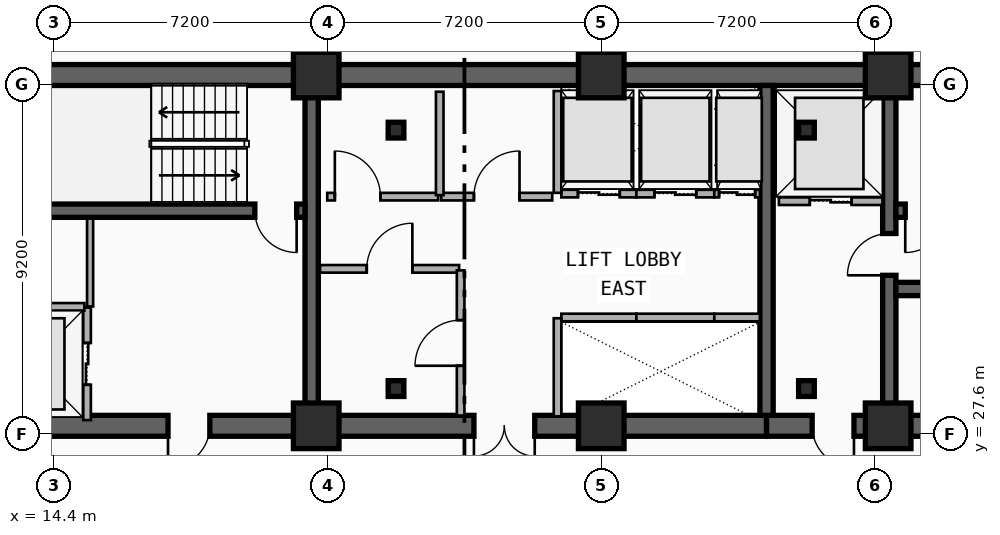
"""IFC4 building model, lengths in metres.
Left out: names, types, materials, properties, quantities, classifications, styles, units other than length and angle.
Written with IfcOpenShell. Run it as: python <this file> out.ifc"""

import sys

from ifc_helpers import new_model, si_unit, direction, frame, frame_2d, origin, origin_2d, place, context, subcontext, project, spatial, rectangle, i_section, extrude, element, fill, save


model = new_model("IFC4")
c1 = context("Model", 3, precision=1e-05, world=origin(), true_north=direction((0.0, 1.0)))
c2 = subcontext(c1, "Body", "Model", "MODEL_VIEW")
j1 = project(units=[si_unit("LENGTHUNIT", "METRE"), si_unit("PLANEANGLEUNIT", "RADIAN")], contexts=[c1])
p1 = place(None, origin())
s1 = spatial("IfcSite", under=j1, at=p1, CompositionType="ELEMENT")
p2 = place(p1, origin())
s2 = spatial("IfcBuilding", under=s1, at=p2, CompositionType="ELEMENT")
p3 = place(p2, frame((0.0, 0.0, 137.7)))
s3 = spatial("IfcBuildingStorey", under=s2, at=p3, CompositionType="ELEMENT", Elevation=137.7)
p4 = place(p3, frame((12.15, 37.05, 0.0), z_axis=(0.0, 0.0, 1.0), x_axis=(1.0, 0.0, 0.0)))
e1 = element("IfcWall", 1, at=p4, inside=s3, PredefinedType="SHEAR", context=c2, shape_type="SweptSolid", body=[
    extrude(rectangle(XDim=33.23, YDim=0.55, at=frame_2d((16.615, 0.0))), origin(), (0.0, 0.0, 1.0), 3.55),
])
p5 = place(p3, frame((21.18, 27.82, 0.0), z_axis=(0.0, 0.0, 1.0), x_axis=(-1.0, 0.0, 0.0)))
e2 = element("IfcWall", 2, at=p5, inside=s3, PredefinedType="SHEAR", context=c2, shape_type="SweptSolid", body=[
    extrude(rectangle(XDim=9.03, YDim=0.55, at=frame_2d((4.515, 0.0))), origin(), (0.0, 0.0, 1.0), 3.55),
])
p6 = place(p5, frame((2.68, 0.0, 0.0)))
e3 = element("IfcOpeningElement", 3, at=p6, cuts=e2, PredefinedType="OPENING", context=c2, shape_type="SweptSolid", body=[
    extrude(rectangle(XDim=1.1, YDim=2.15, at=frame_2d((0.55, 1.075))), frame((0.0, 0.285, 0.0), z_axis=(0.0, -1.0, 0.0), x_axis=(1.0, 0.0, 0.0)), (0.0, 0.0, 1.0), 0.57),
])
p7 = place(p3, frame((33.15, 27.82, 0.0), z_axis=(0.0, 0.0, 1.0), x_axis=(-1.0, 0.0, 0.0)))
e4 = element("IfcWall", 4, at=p7, inside=s3, PredefinedType="SHEAR", context=c2, shape_type="SweptSolid", body=[
    extrude(rectangle(XDim=11.97, YDim=0.55, at=frame_2d((5.985, 0.0))), origin(), (0.0, 0.0, 1.0), 3.55),
])
p8 = place(p7, frame((6.1, 0.0, 0.0)))
e5 = element("IfcOpeningElement", 5, at=p8, cuts=e4, PredefinedType="OPENING", context=c2, shape_type="SweptSolid", body=[
    extrude(rectangle(XDim=1.6, YDim=2.2, at=frame_2d((0.8, 1.1))), frame((0.0, 0.285, 0.0), z_axis=(0.0, -1.0, 0.0), x_axis=(1.0, 0.0, 0.0)), (0.0, 0.0, 1.0), 0.57),
])
p9 = place(p3, frame((45.38, 27.82, 0.0), z_axis=(0.0, 0.0, 1.0), x_axis=(-1.0, 0.0, 0.0)))
e6 = element("IfcWall", 6, at=p9, inside=s3, PredefinedType="SHEAR", context=c2, shape_type="SweptSolid", body=[
    extrude(rectangle(XDim=12.23, YDim=0.55, at=frame_2d((6.115, 0.0))), origin(), (0.0, 0.0, 1.0), 3.55),
])
p10 = place(p9, frame((9.93, 0.0, 0.0)))
e7 = element("IfcOpeningElement", 7, at=p10, cuts=e6, PredefinedType="OPENING", context=c2, shape_type="SweptSolid", body=[
    extrude(rectangle(XDim=1.1, YDim=2.15, at=frame_2d((0.55, 1.075))), frame((0.0, 0.285, 0.0), z_axis=(0.0, -1.0, 0.0), x_axis=(1.0, 0.0, 0.0)), (0.0, 0.0, 1.0), 0.57),
])
p11 = place(p9, frame((6.23, 0.0, 0.0)))
e8 = element("IfcOpeningElement", 8, at=p11, cuts=e6, PredefinedType="OPENING", context=c2, shape_type="SweptSolid", body=[
    extrude(rectangle(XDim=1.1, YDim=2.15, at=frame_2d((0.55, 1.075))), frame((0.0, 0.285, 0.0), z_axis=(0.0, -1.0, 0.0), x_axis=(1.0, 0.0, 0.0)), (0.0, 0.0, 1.0), 0.57),
])
for number, where, z_axis, x_axis in (
    (9, (21.18, 28.095, 0.0), (0.0, 0.0, 1.0), (0.0, 1.0, 0.0)),
    (10, (33.15, 28.095, 0.0), (0.0, 0.0, 1.0), (0.0, 1.0, 0.0)),
):
    element("IfcWall", number, at=place(p3, frame(where, z_axis=z_axis, x_axis=x_axis)), inside=s3, PredefinedType="SHEAR", context=c2, shape_type="SweptSolid", body=[
        extrude(rectangle(XDim=8.68, YDim=0.35, at=frame_2d((4.34, 0.0))), origin(), (0.0, 0.0, 1.0), 3.55),
    ])
p12 = place(p3, frame((36.38, 28.095, 0.0), z_axis=(0.0, 0.0, 1.0), x_axis=(0.0, 1.0, 0.0)))
e11 = element("IfcWall", 11, at=p12, inside=s3, PredefinedType="SHEAR", context=c2, shape_type="SweptSolid", body=[
    extrude(rectangle(XDim=8.68, YDim=0.35, at=frame_2d((4.34, 0.0))), origin(), (0.0, 0.0, 1.0), 3.55),
])
p13 = place(p12, frame((3.685, 0.0, 0.0)))
e12 = element("IfcOpeningElement", 12, at=p13, cuts=e11, PredefinedType="OPENING", context=c2, shape_type="SweptSolid", body=[
    extrude(rectangle(XDim=1.1, YDim=2.15, at=frame_2d((0.55, 1.075))), frame((0.0, 0.185, 0.0), z_axis=(0.0, -1.0, 0.0), x_axis=(1.0, 0.0, 0.0)), (0.0, 0.0, 1.0), 0.37),
])
p14 = place(p3, frame((21.005, 33.48, 0.0), z_axis=(0.0, 0.0, 1.0), x_axis=(-1.0, 0.0, 0.0)))
e13 = element("IfcWall", 13, at=p14, inside=s3, PredefinedType="SHEAR", context=c2, shape_type="SweptSolid", body=[
    extrude(rectangle(XDim=8.58, YDim=0.35, at=frame_2d((4.29, 0.0))), origin(), (0.0, 0.0, 1.0), 3.55),
])
p15 = place(p14, frame((0.22, 0.0, 0.0)))
e14 = element("IfcOpeningElement", 14, at=p15, cuts=e13, PredefinedType="OPENING", context=c2, shape_type="SweptSolid", body=[
    extrude(rectangle(XDim=1.1, YDim=2.15, at=frame_2d((0.55, 1.075))), frame((0.0, 0.185, 0.0), z_axis=(0.0, -1.0, 0.0), x_axis=(1.0, 0.0, 0.0)), (0.0, 0.0, 1.0), 0.37),
])
p16 = place(p3, frame((45.105, 33.48, 0.0), z_axis=(0.0, 0.0, 1.0), x_axis=(-1.0, 0.0, 0.0)))
e15 = element("IfcWall", 15, at=p16, inside=s3, PredefinedType="SHEAR", context=c2, shape_type="SweptSolid", body=[
    extrude(rectangle(XDim=8.55, YDim=0.35, at=frame_2d((4.275, 0.0))), origin(), (0.0, 0.0, 1.0), 3.55),
])
p17 = place(p16, frame((7.205, 0.0, 0.0)))
e16 = element("IfcOpeningElement", 16, at=p17, cuts=e15, PredefinedType="OPENING", context=c2, shape_type="SweptSolid", body=[
    extrude(rectangle(XDim=1.1, YDim=2.15, at=frame_2d((0.55, 1.075))), frame((0.0, 0.185, 0.0), z_axis=(0.0, -1.0, 0.0), x_axis=(1.0, 0.0, 0.0)), (0.0, 0.0, 1.0), 0.37),
])
p18 = place(p3, frame((36.555, 31.42, 0.0), z_axis=(0.0, 0.0, 1.0), x_axis=(1.0, 0.0, 0.0)))
e17 = element("IfcWall", 17, at=p18, inside=s3, PredefinedType="SHEAR", context=c2, shape_type="SweptSolid", body=[
    extrude(rectangle(XDim=8.55, YDim=0.35, at=frame_2d((4.275, 0.0))), origin(), (0.0, 0.0, 1.0), 3.55),
])
for number, where, z_axis, x_axis in (
    (18, (23.4, 28.8, 0.0), (0.0, 0.0, 1.0), (1.0, 0.0, 0.0)),
    (19, (34.2, 28.8, 0.0), (0.0, 0.0, 1.0), (1.0, 0.0, 0.0)),
    (20, (34.2, 35.6, 0.0), (0.0, 0.0, 1.0), (1.0, 0.0, 0.0)),
    (21, (23.4, 35.6, 0.0), (0.0, 0.0, 1.0), (1.0, 0.0, 0.0)),
):
    element("IfcColumn", number, at=place(p3, frame(where, z_axis=z_axis, x_axis=x_axis)), inside=s3, PredefinedType="COLUMN", context=c2, shape_type="SweptSolid", body=[
        extrude(i_section(OverallWidth=0.413, OverallDepth=0.415, WebThickness=0.03, FlangeThickness=0.047, FilletRadius=0.015, at=origin_2d()), origin(), (0.0, 0.0, 1.0), 3.55),
    ])
for number, where, z_axis, x_axis in (
    (22, (21.3, 27.82, 0.0), (0.0, 0.0, 1.0), (1.0, 0.0, 0.0)),
    (23, (21.3, 37.05, 0.0), (0.0, 0.0, 1.0), (1.0, 0.0, 0.0)),
    (24, (28.8, 27.82, 0.0), (0.0, 0.0, 1.0), (1.0, 0.0, 0.0)),
    (25, (28.8, 37.05, 0.0), (0.0, 0.0, 1.0), (1.0, 0.0, 0.0)),
    (26, (36.35, 27.82, 0.0), (0.0, 0.0, 1.0), (1.0, 0.0, 0.0)),
    (27, (36.35, 37.05, 0.0), (0.0, 0.0, 1.0), (1.0, 0.0, 0.0)),
):
    element("IfcColumn", number, at=place(p3, frame(where, z_axis=z_axis, x_axis=x_axis)), inside=s3, PredefinedType="COLUMN", context=c2, shape_type="SweptSolid", body=[
        extrude(rectangle(XDim=1.2, YDim=1.2, at=origin_2d()), origin(), (0.0, 0.0, 1.0), 3.55),
    ])
p19 = place(p3, frame((15.27, 27.97, 0.0), z_axis=(0.0, 0.0, 1.0), x_axis=(0.0, 1.0, 0.0)))
e28 = element("IfcWall", 28, at=p19, inside=s3, PredefinedType="PARTITIONING", context=c2, shape_type="SweptSolid", body=[
    extrude(rectangle(XDim=2.96, YDim=0.2, at=frame_2d((1.48, 0.0))), origin(), (0.0, 0.0, 1.0), 2.36),
])
p20 = place(p19, frame((0.93, 0.0, 0.0)))
e29 = element("IfcOpeningElement", 29, at=p20, cuts=e28, PredefinedType="OPENING", context=c2, shape_type="SweptSolid", body=[
    extrude(rectangle(XDim=1.1, YDim=2.15, at=frame_2d((0.55, 1.075))), frame((0.0, 0.11, 0.0), z_axis=(0.0, -1.0, 0.0), x_axis=(1.0, 0.0, 0.0)), (0.0, 0.0, 1.0), 0.22),
])
p21 = place(p3, frame((12.45, 30.95, 0.0), z_axis=(0.0, 0.0, 1.0), x_axis=(1.0, 0.0, 0.0)))
e30 = element("IfcWall", 30, at=p21, inside=s3, PredefinedType="PARTITIONING", context=c2, shape_type="SweptSolid", body=[
    extrude(rectangle(XDim=2.75, YDim=0.2, at=frame_2d((1.375, 0.0))), origin(), (0.0, 0.0, 1.0), 2.36),
])
p22 = place(p3, frame((33.475, 33.73, 0.0), z_axis=(0.0, 0.0, 1.0), x_axis=(1.0, 0.0, 0.0)))
e31 = element("IfcWall", 31, at=p22, inside=s3, PredefinedType="PARTITIONING", context=c2, shape_type="SweptSolid", body=[
    extrude(rectangle(XDim=2.725, YDim=0.2, at=frame_2d((1.362, 0.0))), origin(), (0.0, 0.0, 1.0), 2.36),
])
p23 = place(p22, frame((0.812, 0.0, 0.0)))
e32 = element("IfcOpeningElement", 32, at=p23, cuts=e31, PredefinedType="OPENING", context=c2, shape_type="SweptSolid", body=[
    extrude(rectangle(XDim=1.1, YDim=2.15, at=frame_2d((0.55, 1.075))), frame((0.0, 0.11, 0.0), z_axis=(0.0, -1.0, 0.0), x_axis=(1.0, 0.0, 0.0)), (0.0, 0.0, 1.0), 0.22),
])
p24 = place(p3, frame((27.75, 30.67, 0.0), z_axis=(0.0, 0.0, 1.0), x_axis=(1.0, 0.0, 0.0)))
e33 = element("IfcWall", 33, at=p24, inside=s3, PredefinedType="PARTITIONING", context=c2, shape_type="SweptSolid", body=[
    extrude(rectangle(XDim=1.975, YDim=0.2, at=frame_2d((0.988, 0.0))), origin(), (0.0, 0.0, 1.0), 2.36),
])
p25 = place(p3, frame((27.65, 28.07, 0.0), z_axis=(0.0, 0.0, 1.0), x_axis=(0.0, 1.0, 0.0)))
e34 = element("IfcWall", 34, at=p25, inside=s3, PredefinedType="PARTITIONING", context=c2, shape_type="SweptSolid", body=[
    extrude(rectangle(XDim=2.58, YDim=0.2, at=frame_2d((1.29, 0.0))), origin(), (0.0, 0.0, 1.0), 2.36),
])
p26 = place(p3, frame((29.725, 30.67, 0.0), z_axis=(0.0, 0.0, 1.0), x_axis=(1.0, 0.0, 0.0)))
e35 = element("IfcWall", 35, at=p26, inside=s3, PredefinedType="PARTITIONING", context=c2, shape_type="SweptSolid", body=[
    extrude(rectangle(XDim=2.05, YDim=0.2, at=frame_2d((1.025, 0.0))), origin(), (0.0, 0.0, 1.0), 2.67),
])
p27 = place(p3, frame((31.775, 30.67, 0.0), z_axis=(0.0, 0.0, 1.0), x_axis=(1.0, 0.0, 0.0)))
e36 = element("IfcWall", 36, at=p27, inside=s3, PredefinedType="PARTITIONING", context=c2, shape_type="SweptSolid", body=[
    extrude(rectangle(XDim=1.2, YDim=0.2, at=frame_2d((0.6, 0.0))), origin(), (0.0, 0.0, 1.0), 2.67),
])
p28 = place(p3, frame((27.75, 33.93, 0.0), z_axis=(0.0, 0.0, 1.0), x_axis=(1.0, 0.0, 0.0)))
e37 = element("IfcWall", 37, at=p28, inside=s3, PredefinedType="PARTITIONING", context=c2, shape_type="SweptSolid", body=[
    extrude(rectangle(XDim=1.975, YDim=0.2, at=frame_2d((0.988, 0.0))), origin(), (0.0, 0.0, 1.0), 2.36),
])
p29 = place(p28, frame((0.438, 0.0, 0.0)))
e38 = element("IfcOpeningElement", 38, at=p29, cuts=e37, PredefinedType="OPENING", context=c2, shape_type="SweptSolid", body=[
    extrude(rectangle(XDim=1.1, YDim=2.15, at=frame_2d((0.55, 1.075))), frame((0.0, 0.11, 0.0), z_axis=(0.0, -1.0, 0.0), x_axis=(1.0, 0.0, 0.0)), (0.0, 0.0, 1.0), 0.22),
])
p30 = place(p3, frame((27.65, 33.95, 0.0), z_axis=(0.0, 0.0, 1.0), x_axis=(0.0, 1.0, 0.0)))
e39 = element("IfcWall", 39, at=p30, inside=s3, PredefinedType="PARTITIONING", context=c2, shape_type="SweptSolid", body=[
    extrude(rectangle(XDim=2.68, YDim=0.2, at=frame_2d((1.34, 0.0))), origin(), (0.0, 0.0, 1.0), 2.36),
])
p31 = place(p3, frame((29.725, 33.93, 0.0), z_axis=(0.0, 0.0, 1.0), x_axis=(1.0, 0.0, 0.0)))
e40 = element("IfcWall", 40, at=p31, inside=s3, PredefinedType="PARTITIONING", context=c2, shape_type="SweptSolid", body=[
    extrude(rectangle(XDim=2.05, YDim=0.2, at=frame_2d((1.025, 0.0))), origin(), (0.0, 0.0, 1.0), 3.29),
])
p32 = place(p31, frame((0.475, 0.0, 0.0)))
e41 = element("IfcOpeningElement", 41, at=p32, cuts=e40, PredefinedType="OPENING", context=c2, shape_type="SweptSolid", body=[
    extrude(rectangle(XDim=1.1, YDim=2.15, at=frame_2d((0.55, 1.075))), frame((0.0, 0.11, 0.0), z_axis=(0.0, -1.0, 0.0), x_axis=(1.0, 0.0, 0.0)), (0.0, 0.0, 1.0), 0.22),
])
p33 = place(p3, frame((31.775, 33.93, 0.0), z_axis=(0.0, 0.0, 1.0), x_axis=(1.0, 0.0, 0.0)))
e42 = element("IfcWall", 42, at=p33, inside=s3, PredefinedType="PARTITIONING", context=c2, shape_type="SweptSolid", body=[
    extrude(rectangle(XDim=1.2, YDim=0.2, at=frame_2d((0.6, 0.0))), origin(), (0.0, 0.0, 1.0), 3.29),
])
p34 = place(p33, frame((0.125, 0.0, 0.0)))
e43 = element("IfcOpeningElement", 43, at=p34, cuts=e42, PredefinedType="OPENING", context=c2, shape_type="SweptSolid", body=[
    extrude(rectangle(XDim=0.95, YDim=2.15, at=frame_2d((0.475, 1.075))), frame((0.0, 0.11, 0.0), z_axis=(0.0, -1.0, 0.0), x_axis=(1.0, 0.0, 0.0)), (0.0, 0.0, 1.0), 0.22),
])
p35 = place(p3, frame((21.4, 31.95, 0.0), z_axis=(0.0, 0.0, 1.0), x_axis=(1.0, 0.0, 0.0)))
e44 = element("IfcWall", 44, at=p35, inside=s3, PredefinedType="PARTITIONING", context=c2, shape_type="SweptSolid", body=[
    extrude(rectangle(XDim=3.66, YDim=0.2, at=frame_2d((1.83, 0.0))), origin(), (0.0, 0.0, 1.0), 2.36),
])
p36 = place(p35, frame((1.23, 0.0, 0.0)))
e45 = element("IfcOpeningElement", 45, at=p36, cuts=e44, PredefinedType="OPENING", context=c2, shape_type="SweptSolid", body=[
    extrude(rectangle(XDim=1.2, YDim=2.15, at=frame_2d((0.6, 1.075))), frame((0.0, 0.11, 0.0), z_axis=(0.0, -1.0, 0.0), x_axis=(1.0, 0.0, 0.0)), (0.0, 0.0, 1.0), 0.22),
])
p37 = place(p3, frame((21.59, 33.85, 0.0), z_axis=(0.0, 0.0, 1.0), x_axis=(1.0, 0.0, 0.0)))
e46 = element("IfcWall", 46, at=p37, inside=s3, PredefinedType="PARTITIONING", context=c2, shape_type="SweptSolid", body=[
    extrude(rectangle(XDim=2.92, YDim=0.2, at=frame_2d((1.46, 0.0))), origin(), (0.0, 0.0, 1.0), 2.36),
])
p38 = place(p37, frame((0.2, 0.0, 0.0)))
e47 = element("IfcOpeningElement", 47, at=p38, cuts=e46, PredefinedType="OPENING", context=c2, shape_type="SweptSolid", body=[
    extrude(rectangle(XDim=1.2, YDim=2.15, at=frame_2d((0.6, 1.075))), frame((0.0, 0.11, 0.0), z_axis=(0.0, -1.0, 0.0), x_axis=(1.0, 0.0, 0.0)), (0.0, 0.0, 1.0), 0.22),
])
p39 = place(p3, frame((24.59, 33.85, 0.0), z_axis=(0.0, 0.0, 1.0), x_axis=(1.0, 0.0, 0.0)))
e48 = element("IfcWall", 48, at=p39, inside=s3, PredefinedType="PARTITIONING", context=c2, shape_type="SweptSolid", body=[
    extrude(rectangle(XDim=2.92, YDim=0.2, at=frame_2d((1.46, 0.0))), origin(), (0.0, 0.0, 1.0), 3.29),
])
p40 = place(p39, frame((0.86, 0.0, 0.0)))
e49 = element("IfcOpeningElement", 49, at=p40, cuts=e48, PredefinedType="OPENING", context=c2, shape_type="SweptSolid", body=[
    extrude(rectangle(XDim=1.2, YDim=2.15, at=frame_2d((0.6, 1.075))), frame((0.0, 0.11, 0.0), z_axis=(0.0, -1.0, 0.0), x_axis=(1.0, 0.0, 0.0)), (0.0, 0.0, 1.0), 0.22),
])
p41 = place(p3, frame((25.1, 28.09, 0.0), z_axis=(0.0, 0.0, 1.0), x_axis=(0.0, 1.0, 0.0)))
e50 = element("IfcWall", 50, at=p41, inside=s3, PredefinedType="PARTITIONING", context=c2, shape_type="SweptSolid", body=[
    extrude(rectangle(XDim=3.82, YDim=0.2, at=frame_2d((1.91, 0.0))), origin(), (0.0, 0.0, 1.0), 2.67),
])
p42 = place(p41, frame((1.31, 0.0, 0.0)))
e51 = element("IfcOpeningElement", 51, at=p42, cuts=e50, PredefinedType="OPENING", context=c2, shape_type="SweptSolid", body=[
    extrude(rectangle(XDim=1.2, YDim=2.15, at=frame_2d((0.6, 1.075))), frame((0.0, 0.11, 0.0), z_axis=(0.0, -1.0, 0.0), x_axis=(1.0, 0.0, 0.0)), (0.0, 0.0, 1.0), 0.22),
])
p43 = place(p3, frame((24.55, 33.89, 0.0), z_axis=(0.0, 0.0, 1.0), x_axis=(0.0, 1.0, 0.0)))
e52 = element("IfcWall", 52, at=p43, inside=s3, PredefinedType="PARTITIONING", context=c2, shape_type="SweptSolid", body=[
    extrude(rectangle(XDim=2.72, YDim=0.2, at=frame_2d((1.36, 0.0))), origin(), (0.0, 0.0, 1.0), 3.29),
])
p44 = place(p3, frame((15.35, 30.96, 0.0), z_axis=(0.0, 0.0, 1.0), x_axis=(0.0, 1.0, 0.0)))
e53 = element("IfcWall", 53, at=p44, inside=s3, PredefinedType="PARTITIONING", context=c2, shape_type="SweptSolid", body=[
    extrude(rectangle(XDim=2.31, YDim=0.16, at=frame_2d((1.155, 0.0))), origin(), (0.0, 0.0, 1.0), 3.29),
])
p45 = place(p20, origin())
e54 = element("IfcDoor", 54, at=p45, inside=s3, OperationType="DOUBLE_DOOR_SLIDING", PredefinedType="DOOR", context=c2, shape_type="SweptSolid", body=[
    extrude(rectangle(XDim=1.1, YDim=2.15, at=frame_2d((0.55, 1.075))), frame((0.0, 0.025, 0.0), z_axis=(0.0, -1.0, 0.0), x_axis=(1.0, 0.0, 0.0)), (0.0, 0.0, 1.0), 0.05),
])
fill(e29, e54)
p46 = place(p23, origin())
e55 = element("IfcDoor", 55, at=p46, inside=s3, OperationType="DOUBLE_DOOR_SLIDING", PredefinedType="DOOR", context=c2, shape_type="SweptSolid", body=[
    extrude(rectangle(XDim=1.1, YDim=2.15, at=frame_2d((0.55, 1.075))), frame((0.0, 0.025, 0.0), z_axis=(0.0, -1.0, 0.0), x_axis=(1.0, 0.0, 0.0)), (0.0, 0.0, 1.0), 0.05),
])
fill(e32, e55)
p47 = place(p29, origin())
e56 = element("IfcDoor", 56, at=p47, inside=s3, OperationType="DOUBLE_DOOR_SLIDING", PredefinedType="DOOR", context=c2, shape_type="SweptSolid", body=[
    extrude(rectangle(XDim=1.1, YDim=2.15, at=frame_2d((0.55, 1.075))), frame((0.0, 0.025, 0.0), z_axis=(0.0, -1.0, 0.0), x_axis=(1.0, 0.0, 0.0)), (0.0, 0.0, 1.0), 0.05),
])
fill(e38, e56)
p48 = place(p32, origin())
e57 = element("IfcDoor", 57, at=p48, inside=s3, OperationType="DOUBLE_DOOR_SLIDING", PredefinedType="DOOR", context=c2, shape_type="SweptSolid", body=[
    extrude(rectangle(XDim=1.1, YDim=2.15, at=frame_2d((0.55, 1.075))), frame((0.0, 0.025, 0.0), z_axis=(0.0, -1.0, 0.0), x_axis=(1.0, 0.0, 0.0)), (0.0, 0.0, 1.0), 0.05),
])
fill(e41, e57)
p49 = place(p34, origin())
e58 = element("IfcDoor", 58, at=p49, inside=s3, OperationType="DOUBLE_DOOR_SLIDING", PredefinedType="DOOR", context=c2, shape_type="SweptSolid", body=[
    extrude(rectangle(XDim=0.95, YDim=2.15, at=frame_2d((0.475, 1.075))), frame((0.0, 0.025, 0.0), z_axis=(0.0, -1.0, 0.0), x_axis=(1.0, 0.0, 0.0)), (0.0, 0.0, 1.0), 0.05),
])
fill(e43, e58)
p50 = place(p15, origin())
e59 = element("IfcDoor", 59, at=p50, inside=s3, OperationType="SINGLE_SWING_LEFT", PredefinedType="DOOR", context=c2, shape_type="SweptSolid", body=[
    extrude(rectangle(XDim=1.1, YDim=2.15, at=frame_2d((0.55, 1.075))), frame((0.0, 0.025, 0.0), z_axis=(0.0, -1.0, 0.0), x_axis=(1.0, 0.0, 0.0)), (0.0, 0.0, 1.0), 0.05),
])
fill(e14, e59)
p51 = place(p6, origin())
e60 = element("IfcDoor", 60, at=p51, inside=s3, OperationType="SINGLE_SWING_RIGHT", PredefinedType="DOOR", context=c2, shape_type="SweptSolid", body=[
    extrude(rectangle(XDim=1.1, YDim=2.15, at=frame_2d((0.55, 1.075))), frame((0.0, 0.025, 0.0), z_axis=(0.0, -1.0, 0.0), x_axis=(1.0, 0.0, 0.0)), (0.0, 0.0, 1.0), 0.05),
])
fill(e3, e60)
p52 = place(p17, origin())
e61 = element("IfcDoor", 61, at=p52, inside=s3, OperationType="SINGLE_SWING_RIGHT", PredefinedType="DOOR", context=c2, shape_type="SweptSolid", body=[
    extrude(rectangle(XDim=1.1, YDim=2.15, at=frame_2d((0.55, 1.075))), frame((0.0, 0.025, 0.0), z_axis=(0.0, -1.0, 0.0), x_axis=(1.0, 0.0, 0.0)), (0.0, 0.0, 1.0), 0.05),
])
fill(e16, e61)
p53 = place(p13, origin())
e62 = element("IfcDoor", 62, at=p53, inside=s3, OperationType="SINGLE_SWING_LEFT", PredefinedType="DOOR", context=c2, shape_type="SweptSolid", body=[
    extrude(rectangle(XDim=1.1, YDim=2.15, at=frame_2d((0.55, 1.075))), frame((0.0, 0.025, 0.0), z_axis=(0.0, -1.0, 0.0), x_axis=(1.0, 0.0, 0.0)), (0.0, 0.0, 1.0), 0.05),
])
fill(e12, e62)
p54 = place(p10, origin())
e63 = element("IfcDoor", 63, at=p54, inside=s3, OperationType="SINGLE_SWING_LEFT", PredefinedType="DOOR", context=c2, shape_type="SweptSolid", body=[
    extrude(rectangle(XDim=1.1, YDim=2.15, at=frame_2d((0.55, 1.075))), frame((0.0, 0.025, 0.0), z_axis=(0.0, -1.0, 0.0), x_axis=(1.0, 0.0, 0.0)), (0.0, 0.0, 1.0), 0.05),
])
fill(e7, e63)
p55 = place(p8, origin())
e64 = element("IfcDoor", 64, at=p55, inside=s3, OperationType="SINGLE_SWING_LEFT", PredefinedType="DOOR", context=c2, shape_type="SweptSolid", body=[
    extrude(rectangle(XDim=1.6, YDim=2.2, at=frame_2d((0.8, 1.1))), frame((0.0, 0.025, 0.0), z_axis=(0.0, -1.0, 0.0), x_axis=(1.0, 0.0, 0.0)), (0.0, 0.0, 1.0), 0.05),
])
fill(e5, e64)
p56 = place(p36, origin())
e65 = element("IfcDoor", 65, at=p56, inside=s3, OperationType="SINGLE_SWING_RIGHT", PredefinedType="DOOR", context=c2, shape_type="SweptSolid", body=[
    extrude(rectangle(XDim=1.2, YDim=2.15, at=frame_2d((0.6, 1.075))), frame((0.0, 0.025, 0.0), z_axis=(0.0, -1.0, 0.0), x_axis=(1.0, 0.0, 0.0)), (0.0, 0.0, 1.0), 0.05),
])
fill(e45, e65)
p57 = place(p38, origin())
e66 = element("IfcDoor", 66, at=p57, inside=s3, OperationType="SINGLE_SWING_LEFT", PredefinedType="DOOR", context=c2, shape_type="SweptSolid", body=[
    extrude(rectangle(XDim=1.2, YDim=2.15, at=frame_2d((0.6, 1.075))), frame((0.0, 0.025, 0.0), z_axis=(0.0, -1.0, 0.0), x_axis=(1.0, 0.0, 0.0)), (0.0, 0.0, 1.0), 0.05),
])
fill(e47, e66)
p58 = place(p40, origin())
e67 = element("IfcDoor", 67, at=p58, inside=s3, OperationType="SINGLE_SWING_RIGHT", PredefinedType="DOOR", context=c2, shape_type="SweptSolid", body=[
    extrude(rectangle(XDim=1.2, YDim=2.15, at=frame_2d((0.6, 1.075))), frame((0.0, 0.025, 0.0), z_axis=(0.0, -1.0, 0.0), x_axis=(1.0, 0.0, 0.0)), (0.0, 0.0, 1.0), 0.05),
])
fill(e49, e67)
p59 = place(p42, origin())
e68 = element("IfcDoor", 68, at=p59, inside=s3, OperationType="SINGLE_SWING_LEFT", PredefinedType="DOOR", context=c2, shape_type="SweptSolid", body=[
    extrude(rectangle(XDim=1.2, YDim=2.15, at=frame_2d((0.6, 1.075))), frame((0.0, 0.025, 0.0), z_axis=(0.0, -1.0, 0.0), x_axis=(1.0, 0.0, 0.0)), (0.0, 0.0, 1.0), 0.05),
])
fill(e51, e68)
save(model, sys.argv[1])
